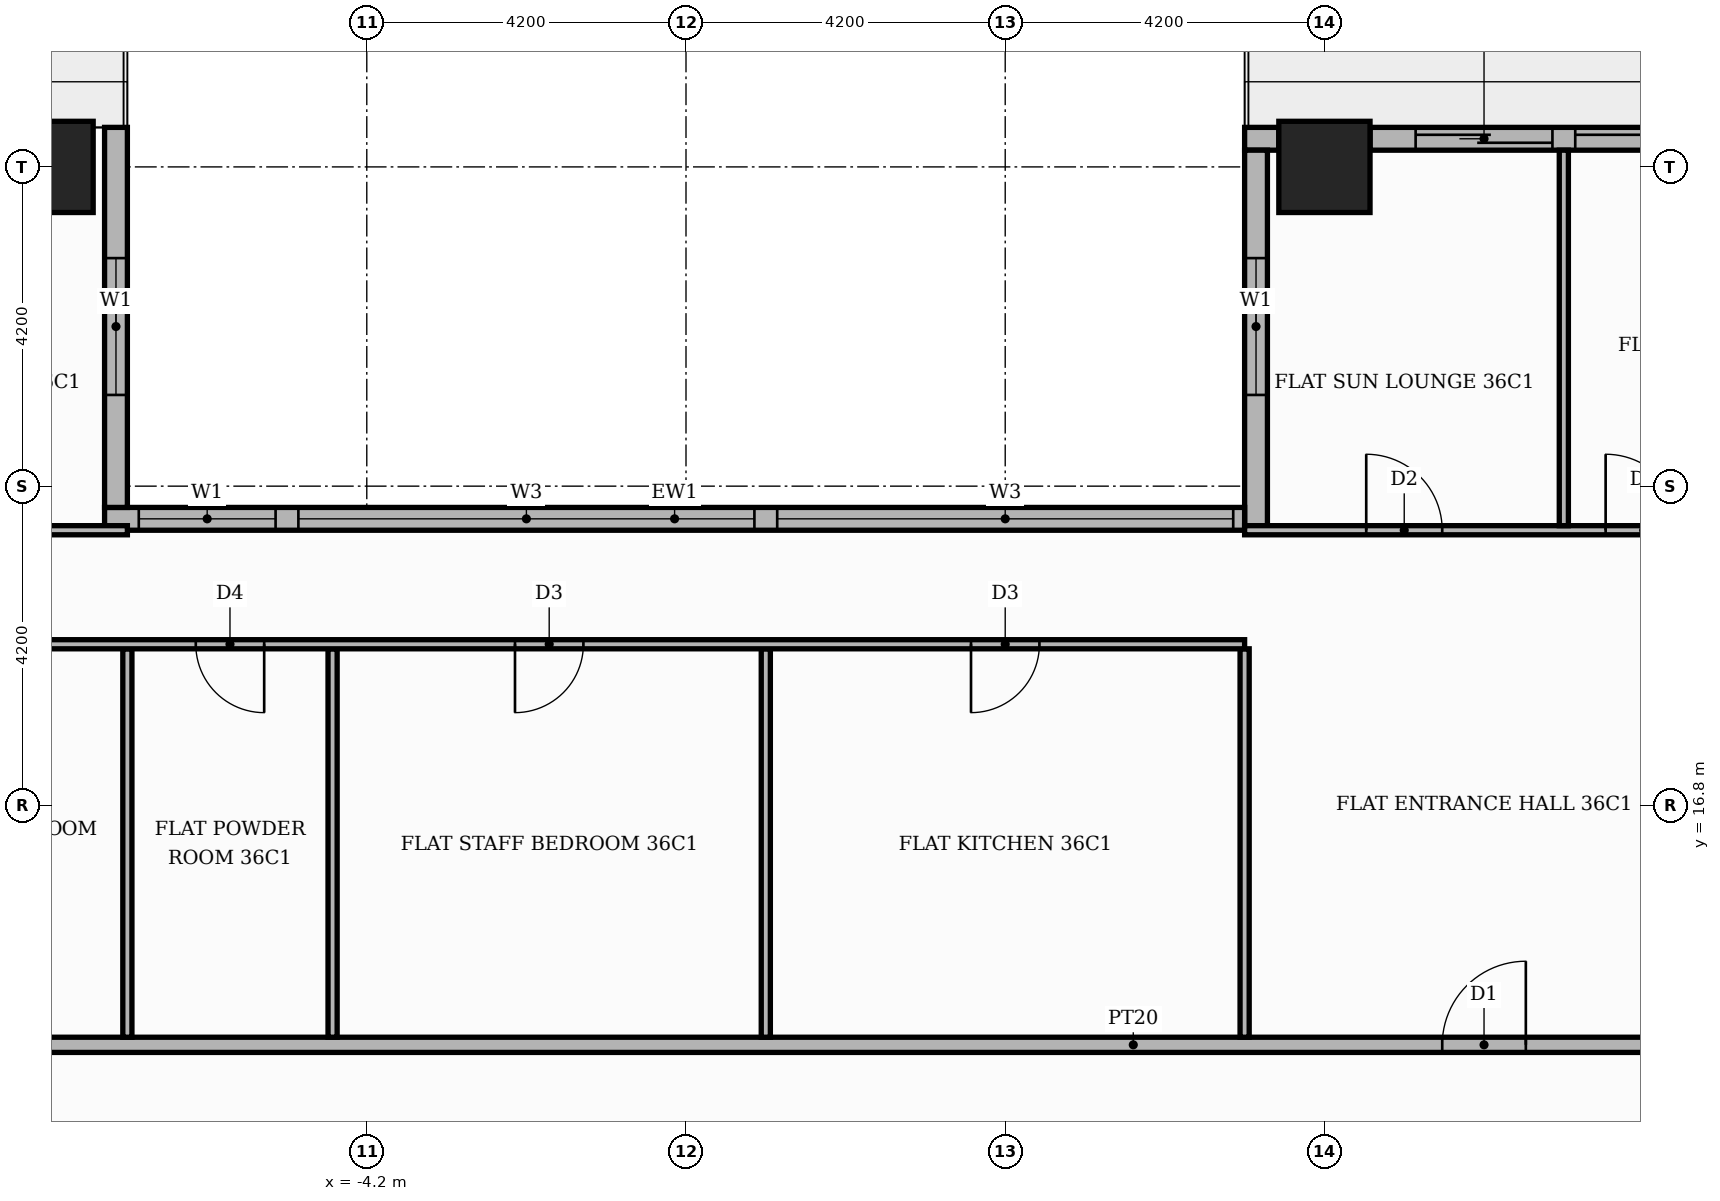
"""IFC4 building model, lengths in metres.
Left out: names, types, materials, properties, quantities, classifications, styles, units other than length and angle.
Written with IfcOpenShell. Run it as: python <this file> out.ifc"""

import sys

from ifc_helpers import new_model, si_unit, direction, frame, frame_2d, origin, origin_2d, place, context, subcontext, project, spatial, rectangle, extrude, element, fill, save


model = new_model("IFC4")
c1 = context("Model", 3, precision=1e-05, world=origin(), true_north=direction((0.0, 1.0)))
c2 = subcontext(c1, "Body", "Model", "MODEL_VIEW")
j1 = project(units=[si_unit("LENGTHUNIT", "METRE"), si_unit("PLANEANGLEUNIT", "RADIAN")], contexts=[c1])
p1 = place(None, origin())
s1 = spatial("IfcSite", under=j1, at=p1, CompositionType="ELEMENT")
p2 = place(p1, origin())
s2 = spatial("IfcBuilding", under=s1, at=p2, CompositionType="ELEMENT")
p3 = place(p2, frame((0.0, 0.0, 153.3)))
s3 = spatial("IfcBuildingStorey", under=s2, at=p3, CompositionType="ELEMENT", Elevation=153.3)
for number, where, z_axis, x_axis in (
    (1, (-8.4, 25.2, 0.0), (0.0, 0.0, 1.0), (1.0, 0.0, 0.0)),
    (2, (8.4, 25.2, 0.0), (0.0, 0.0, 1.0), (1.0, 0.0, 0.0)),
):
    element("IfcColumn", number, at=place(p3, frame(where, z_axis=z_axis, x_axis=x_axis)), inside=s3, PredefinedType="COLUMN", context=c2, shape_type="SweptSolid", body=[
        extrude(rectangle(XDim=1.2, YDim=1.2, at=origin_2d()), origin(), (0.0, 0.0, 1.0), 3.9),
    ])
p4 = place(p3, frame((16.2, 25.57, 0.0), z_axis=(0.0, 0.0, 1.0), x_axis=(-1.0, 0.0, 0.0)))
e3 = element("IfcWall", 3, at=p4, inside=s3, PredefinedType="STANDARD", context=c2, shape_type="SweptSolid", body=[
    extrude(rectangle(XDim=7.2, YDim=0.3, at=frame_2d((3.6, 0.0))), origin(), (0.0, 0.0, 1.0), 3.48),
])
p5 = place(p4, frame((0.6, 0.0, 0.0)))
e4 = element("IfcOpeningElement", 4, at=p5, cuts=e3, PredefinedType="OPENING", context=c2, shape_type="SweptSolid", body=[
    extrude(rectangle(XDim=3.9, YDim=2.4, at=frame_2d((1.95, 1.2))), frame((0.0, 0.16, 0.0), z_axis=(0.0, -1.0, 0.0), x_axis=(1.0, 0.0, 0.0)), (0.0, 0.0, 1.0), 0.32),
])
p6 = place(p4, frame((4.8, 0.0, 0.0)))
e5 = element("IfcOpeningElement", 5, at=p6, cuts=e3, PredefinedType="OPENING", context=c2, shape_type="SweptSolid", body=[
    extrude(rectangle(XDim=1.8, YDim=2.4, at=frame_2d((0.9, 1.2))), frame((0.0, 0.16, 0.0), z_axis=(0.0, -1.0, 0.0), x_axis=(1.0, 0.0, 0.0)), (0.0, 0.0, 1.0), 0.32),
])
p7 = place(p3, frame((7.8, 25.57, 0.0), z_axis=(0.0, 0.0, 1.0), x_axis=(-1.0, 0.0, 0.0)))
e6 = element("IfcWall", 6, at=p7, inside=s3, PredefinedType="STANDARD", context=c2, shape_type="SweptSolid", body=[
    extrude(rectangle(XDim=0.45, YDim=0.3, at=frame_2d((0.225, 0.0))), origin(), (0.0, 0.0, 1.0), 3.48),
])
p8 = place(p3, frame((7.5, 25.42, 0.0), z_axis=(0.0, 0.0, 1.0), x_axis=(0.0, -1.0, 0.0)))
e7 = element("IfcWall", 7, at=p8, inside=s3, PredefinedType="STANDARD", context=c2, shape_type="SweptSolid", body=[
    extrude(rectangle(XDim=5.0, YDim=0.3, at=frame_2d((2.5, 0.0))), origin(), (0.0, 0.0, 1.0), 3.48),
])
p9 = place(p8, frame((1.42, 0.0, 0.9)))
e8 = element("IfcOpeningElement", 8, at=p9, cuts=e7, PredefinedType="OPENING", context=c2, shape_type="SweptSolid", body=[
    extrude(rectangle(XDim=1.8, YDim=2.1, at=frame_2d((0.9, 1.05))), frame((0.0, 0.16, 0.0), z_axis=(0.0, -1.0, 0.0), x_axis=(1.0, 0.0, 0.0)), (0.0, 0.0, 1.0), 0.32),
])
p10 = place(p3, frame((7.35, 20.57, 0.0), z_axis=(0.0, 0.0, 1.0), x_axis=(-1.0, 0.0, 0.0)))
e9 = element("IfcWall", 9, at=p10, inside=s3, PredefinedType="STANDARD", context=c2, shape_type="SweptSolid", body=[
    extrude(rectangle(XDim=15.0, YDim=0.3, at=frame_2d((7.5, 0.0))), origin(), (0.0, 0.0, 1.0), 3.48),
])
p11 = place(p10, frame((0.15, 0.0, 0.9)))
e10 = element("IfcOpeningElement", 10, at=p11, cuts=e9, PredefinedType="OPENING", context=c2, shape_type="SweptSolid", body=[
    extrude(rectangle(XDim=6.0, YDim=2.1, at=frame_2d((3.0, 1.05))), frame((0.0, 0.16, 0.0), z_axis=(0.0, -1.0, 0.0), x_axis=(1.0, 0.0, 0.0)), (0.0, 0.0, 1.0), 0.32),
])
p12 = place(p10, frame((6.45, 0.0, 0.9)))
e11 = element("IfcOpeningElement", 11, at=p12, cuts=e9, PredefinedType="OPENING", context=c2, shape_type="SweptSolid", body=[
    extrude(rectangle(XDim=6.0, YDim=2.1, at=frame_2d((3.0, 1.05))), frame((0.0, 0.16, 0.0), z_axis=(0.0, -1.0, 0.0), x_axis=(1.0, 0.0, 0.0)), (0.0, 0.0, 1.0), 0.32),
])
p13 = place(p10, frame((12.75, 0.0, 0.9)))
e12 = element("IfcOpeningElement", 12, at=p13, cuts=e9, PredefinedType="OPENING", context=c2, shape_type="SweptSolid", body=[
    extrude(rectangle(XDim=1.8, YDim=2.1, at=frame_2d((0.9, 1.05))), frame((0.0, 0.16, 0.0), z_axis=(0.0, -1.0, 0.0), x_axis=(1.0, 0.0, 0.0)), (0.0, 0.0, 1.0), 0.32),
])
p14 = place(p3, frame((-7.5, 20.72, 0.0), z_axis=(0.0, 0.0, 1.0), x_axis=(0.0, 1.0, 0.0)))
e13 = element("IfcWall", 13, at=p14, inside=s3, PredefinedType="STANDARD", context=c2, shape_type="SweptSolid", body=[
    extrude(rectangle(XDim=5.0, YDim=0.3, at=frame_2d((2.5, 0.0))), origin(), (0.0, 0.0, 1.0), 3.48),
])
p15 = place(p14, frame((1.48, 0.0, 0.9)))
e14 = element("IfcOpeningElement", 14, at=p15, cuts=e13, PredefinedType="OPENING", context=c2, shape_type="SweptSolid", body=[
    extrude(rectangle(XDim=1.8, YDim=2.1, at=frame_2d((0.9, 1.05))), frame((0.0, 0.16, 0.0), z_axis=(0.0, -1.0, 0.0), x_axis=(1.0, 0.0, 0.0)), (0.0, 0.0, 1.0), 0.32),
])
p16 = place(p3, frame((-13.65, 13.65, 0.0), z_axis=(0.0, 0.0, 1.0), x_axis=(1.0, 0.0, 0.0)))
e15 = element("IfcWall", 15, at=p16, inside=s3, PredefinedType="PARTITIONING", context=c2, shape_type="SweptSolid", body=[
    extrude(rectangle(XDim=39.07, YDim=0.2, at=frame_2d((19.535, 0.0))), origin(), (0.0, 0.0, 1.0), 3.48),
])
p17 = place(p16, frame((23.6, 0.0, 0.0)))
e16 = element("IfcOpeningElement", 16, at=p17, cuts=e15, PredefinedType="OPENING", context=c2, shape_type="SweptSolid", body=[
    extrude(rectangle(XDim=1.1, YDim=2.4, at=frame_2d((0.55, 1.2))), frame((0.0, 0.11, 0.0), z_axis=(0.0, -1.0, 0.0), x_axis=(1.0, 0.0, 0.0)), (0.0, 0.0, 1.0), 0.22),
])
for number, where, z_axis, x_axis in (
    (17, (-7.35, 13.75, 0.0), (0.0, 0.0, 1.0), (0.0, 1.0, 0.0)),
    (18, (-4.65, 13.75, 0.0), (0.0, 0.0, 1.0), (0.0, 1.0, 0.0)),
    (19, (1.05, 13.75, 0.0), (0.0, 0.0, 1.0), (0.0, 1.0, 0.0)),
    (20, (7.35, 13.75, 0.0), (0.0, 0.0, 1.0), (0.0, 1.0, 0.0)),
):
    element("IfcWall", number, at=place(p3, frame(where, z_axis=z_axis, x_axis=x_axis)), inside=s3, PredefinedType="PARTITIONING", context=c2, shape_type="SweptSolid", body=[
        extrude(rectangle(XDim=5.11, YDim=0.12, at=frame_2d((2.555, 0.0))), origin(), (0.0, 0.0, 1.0), 3.48),
    ])
p18 = place(p3, frame((-13.55, 18.92, 0.0), z_axis=(0.0, 0.0, 1.0), x_axis=(1.0, 0.0, 0.0)))
e21 = element("IfcWall", 21, at=p18, inside=s3, PredefinedType="PARTITIONING", context=c2, shape_type="SweptSolid", body=[
    extrude(rectangle(XDim=20.9, YDim=0.12, at=frame_2d((10.45, 0.0))), origin(), (0.0, 0.0, 1.0), 3.48),
])
p19 = place(p18, frame((17.3, 0.0, 0.0)))
e22 = element("IfcOpeningElement", 22, at=p19, cuts=e21, PredefinedType="OPENING", context=c2, shape_type="SweptSolid", body=[
    extrude(rectangle(XDim=0.9, YDim=2.1, at=frame_2d((0.45, 1.05))), frame((0.0, 0.07, 0.0), z_axis=(0.0, -1.0, 0.0), x_axis=(1.0, 0.0, 0.0)), (0.0, 0.0, 1.0), 0.14),
])
p20 = place(p18, frame((11.3, 0.0, 0.0)))
e23 = element("IfcOpeningElement", 23, at=p20, cuts=e21, PredefinedType="OPENING", context=c2, shape_type="SweptSolid", body=[
    extrude(rectangle(XDim=0.9, YDim=2.1, at=frame_2d((0.45, 1.05))), frame((0.0, 0.07, 0.0), z_axis=(0.0, -1.0, 0.0), x_axis=(1.0, 0.0, 0.0)), (0.0, 0.0, 1.0), 0.14),
])
p21 = place(p18, frame((7.1, 0.0, 0.0)))
e24 = element("IfcOpeningElement", 24, at=p21, cuts=e21, PredefinedType="OPENING", context=c2, shape_type="SweptSolid", body=[
    extrude(rectangle(XDim=0.9, YDim=2.1, at=frame_2d((0.45, 1.05))), frame((0.0, 0.07, 0.0), z_axis=(0.0, -1.0, 0.0), x_axis=(1.0, 0.0, 0.0)), (0.0, 0.0, 1.0), 0.14),
])
p22 = place(p18, frame((3.65, 0.0, 0.0)))
e25 = element("IfcOpeningElement", 25, at=p22, cuts=e21, PredefinedType="OPENING", context=c2, shape_type="SweptSolid", body=[
    extrude(rectangle(XDim=0.9, YDim=2.1, at=frame_2d((0.45, 1.05))), frame((0.0, 0.07, 0.0), z_axis=(0.0, -1.0, 0.0), x_axis=(1.0, 0.0, 0.0)), (0.0, 0.0, 1.0), 0.14),
])
p23 = place(p18, frame((0.5, 0.0, 0.0)))
e26 = element("IfcOpeningElement", 26, at=p23, cuts=e21, PredefinedType="OPENING", context=c2, shape_type="SweptSolid", body=[
    extrude(rectangle(XDim=0.9, YDim=2.1, at=frame_2d((0.45, 1.05))), frame((0.0, 0.07, 0.0), z_axis=(0.0, -1.0, 0.0), x_axis=(1.0, 0.0, 0.0)), (0.0, 0.0, 1.0), 0.14),
])
p24 = place(p3, frame((-13.55, 20.42, 0.0), z_axis=(0.0, 0.0, 1.0), x_axis=(1.0, 0.0, 0.0)))
e27 = element("IfcWall", 27, at=p24, inside=s3, PredefinedType="PARTITIONING", context=c2, shape_type="SweptSolid", body=[
    extrude(rectangle(XDim=6.2, YDim=0.12, at=frame_2d((3.1, 0.0))), origin(), (0.0, 0.0, 1.0), 3.48),
])
p25 = place(p24, frame((3.65, 0.0, 0.0)))
e28 = element("IfcOpeningElement", 28, at=p25, cuts=e27, PredefinedType="OPENING", context=c2, shape_type="SweptSolid", body=[
    extrude(rectangle(XDim=0.9, YDim=2.1, at=frame_2d((0.45, 1.05))), frame((0.0, 0.07, 0.0), z_axis=(0.0, -1.0, 0.0), x_axis=(1.0, 0.0, 0.0)), (0.0, 0.0, 1.0), 0.14),
])
p26 = place(p3, frame((7.35, 20.42, 0.0), z_axis=(0.0, 0.0, 1.0), x_axis=(1.0, 0.0, 0.0)))
e29 = element("IfcWall", 29, at=p26, inside=s3, PredefinedType="PARTITIONING", context=c2, shape_type="SweptSolid", body=[
    extrude(rectangle(XDim=18.07, YDim=0.12, at=frame_2d((9.035, 0.0))), origin(), (0.0, 0.0, 1.0), 3.48),
])
p27 = place(p26, frame((4.75, 0.0, 0.0)))
e30 = element("IfcOpeningElement", 30, at=p27, cuts=e29, PredefinedType="OPENING", context=c2, shape_type="SweptSolid", body=[
    extrude(rectangle(XDim=1.0, YDim=2.1, at=frame_2d((0.5, 1.05))), frame((0.0, 0.07, 0.0), z_axis=(0.0, -1.0, 0.0), x_axis=(1.0, 0.0, 0.0)), (0.0, 0.0, 1.0), 0.14),
])
p28 = place(p26, frame((1.6, 0.0, 0.0)))
e31 = element("IfcOpeningElement", 31, at=p28, cuts=e29, PredefinedType="OPENING", context=c2, shape_type="SweptSolid", body=[
    extrude(rectangle(XDim=1.0, YDim=2.1, at=frame_2d((0.5, 1.05))), frame((0.0, 0.07, 0.0), z_axis=(0.0, -1.0, 0.0), x_axis=(1.0, 0.0, 0.0)), (0.0, 0.0, 1.0), 0.14),
])
p29 = place(p3, frame((11.55, 20.48, 0.0), z_axis=(0.0, 0.0, 1.0), x_axis=(0.0, 1.0, 0.0)))
e32 = element("IfcWall", 32, at=p29, inside=s3, PredefinedType="PARTITIONING", context=c2, shape_type="SweptSolid", body=[
    extrude(rectangle(XDim=4.94, YDim=0.12, at=frame_2d((2.47, 0.0))), origin(), (0.0, 0.0, 1.0), 3.48),
])
p30 = place(p5, origin())
e33 = element("IfcDoor", 33, at=p30, inside=s3, OperationType="SLIDING_TO_LEFT", PredefinedType="DOOR", context=c2, shape_type="SweptSolid", body=[
    extrude(rectangle(XDim=3.9, YDim=2.4, at=frame_2d((1.95, 1.2))), frame((0.0, 0.025, 0.0), z_axis=(0.0, -1.0, 0.0), x_axis=(1.0, 0.0, 0.0)), (0.0, 0.0, 1.0), 0.05),
])
fill(e4, e33)
p31 = place(p6, origin())
e34 = element("IfcDoor", 34, at=p31, inside=s3, OperationType="SLIDING_TO_RIGHT", PredefinedType="DOOR", context=c2, shape_type="SweptSolid", body=[
    extrude(rectangle(XDim=1.8, YDim=2.4, at=frame_2d((0.9, 1.2))), frame((0.0, 0.025, 0.0), z_axis=(0.0, -1.0, 0.0), x_axis=(1.0, 0.0, 0.0)), (0.0, 0.0, 1.0), 0.05),
])
fill(e5, e34)
p32 = place(p9, origin())
e35 = element("IfcWindow", 35, at=p32, inside=s3, PartitioningType="SINGLE_PANEL", PredefinedType="WINDOW", context=c2, shape_type="SweptSolid", body=[
    extrude(rectangle(XDim=1.8, YDim=2.1, at=frame_2d((0.9, 1.05))), frame((0.0, 0.03, 0.0), z_axis=(0.0, -1.0, 0.0), x_axis=(1.0, 0.0, 0.0)), (0.0, 0.0, 1.0), 0.06),
])
fill(e8, e35)
p33 = place(p11, origin())
e36 = element("IfcWindow", 36, at=p33, inside=s3, PartitioningType="SINGLE_PANEL", PredefinedType="WINDOW", context=c2, shape_type="SweptSolid", body=[
    extrude(rectangle(XDim=6.0, YDim=2.1, at=frame_2d((3.0, 1.05))), frame((0.0, 0.03, 0.0), z_axis=(0.0, -1.0, 0.0), x_axis=(1.0, 0.0, 0.0)), (0.0, 0.0, 1.0), 0.06),
])
fill(e10, e36)
p34 = place(p12, origin())
e37 = element("IfcWindow", 37, at=p34, inside=s3, PartitioningType="SINGLE_PANEL", PredefinedType="WINDOW", context=c2, shape_type="SweptSolid", body=[
    extrude(rectangle(XDim=6.0, YDim=2.1, at=frame_2d((3.0, 1.05))), frame((0.0, 0.03, 0.0), z_axis=(0.0, -1.0, 0.0), x_axis=(1.0, 0.0, 0.0)), (0.0, 0.0, 1.0), 0.06),
])
fill(e11, e37)
p35 = place(p13, origin())
e38 = element("IfcWindow", 38, at=p35, inside=s3, PartitioningType="SINGLE_PANEL", PredefinedType="WINDOW", context=c2, shape_type="SweptSolid", body=[
    extrude(rectangle(XDim=1.8, YDim=2.1, at=frame_2d((0.9, 1.05))), frame((0.0, 0.03, 0.0), z_axis=(0.0, -1.0, 0.0), x_axis=(1.0, 0.0, 0.0)), (0.0, 0.0, 1.0), 0.06),
])
fill(e12, e38)
p36 = place(p15, origin())
e39 = element("IfcWindow", 39, at=p36, inside=s3, PartitioningType="SINGLE_PANEL", PredefinedType="WINDOW", context=c2, shape_type="SweptSolid", body=[
    extrude(rectangle(XDim=1.8, YDim=2.1, at=frame_2d((0.9, 1.05))), frame((0.0, 0.03, 0.0), z_axis=(0.0, -1.0, 0.0), x_axis=(1.0, 0.0, 0.0)), (0.0, 0.0, 1.0), 0.06),
])
fill(e14, e39)
p37 = place(p17, origin())
e40 = element("IfcDoor", 40, at=p37, inside=s3, OperationType="SINGLE_SWING_RIGHT", PredefinedType="DOOR", context=c2, shape_type="SweptSolid", body=[
    extrude(rectangle(XDim=1.1, YDim=2.4, at=frame_2d((0.55, 1.2))), frame((0.0, 0.025, 0.0), z_axis=(0.0, -1.0, 0.0), x_axis=(1.0, 0.0, 0.0)), (0.0, 0.0, 1.0), 0.05),
])
fill(e16, e40)
p38 = place(p19, frame((0.9, 0.0, 0.0), z_axis=(0.0, 0.0, 1.0), x_axis=(-1.0, 0.0, 0.0)))
e41 = element("IfcDoor", 41, at=p38, inside=s3, OperationType="SINGLE_SWING_LEFT", PredefinedType="DOOR", context=c2, shape_type="SweptSolid", body=[
    extrude(rectangle(XDim=0.9, YDim=2.1, at=frame_2d((0.45, 1.05))), frame((0.0, 0.025, 0.0), z_axis=(0.0, -1.0, 0.0), x_axis=(1.0, 0.0, 0.0)), (0.0, 0.0, 1.0), 0.05),
])
fill(e22, e41)
p39 = place(p20, frame((0.9, 0.0, 0.0), z_axis=(0.0, 0.0, 1.0), x_axis=(-1.0, 0.0, 0.0)))
e42 = element("IfcDoor", 42, at=p39, inside=s3, OperationType="SINGLE_SWING_LEFT", PredefinedType="DOOR", context=c2, shape_type="SweptSolid", body=[
    extrude(rectangle(XDim=0.9, YDim=2.1, at=frame_2d((0.45, 1.05))), frame((0.0, 0.025, 0.0), z_axis=(0.0, -1.0, 0.0), x_axis=(1.0, 0.0, 0.0)), (0.0, 0.0, 1.0), 0.05),
])
fill(e23, e42)
p40 = place(p21, frame((0.9, 0.0, 0.0), z_axis=(0.0, 0.0, 1.0), x_axis=(-1.0, 0.0, 0.0)))
e43 = element("IfcDoor", 43, at=p40, inside=s3, OperationType="SINGLE_SWING_RIGHT", PredefinedType="DOOR", context=c2, shape_type="SweptSolid", body=[
    extrude(rectangle(XDim=0.9, YDim=2.1, at=frame_2d((0.45, 1.05))), frame((0.0, 0.025, 0.0), z_axis=(0.0, -1.0, 0.0), x_axis=(1.0, 0.0, 0.0)), (0.0, 0.0, 1.0), 0.05),
])
fill(e24, e43)
p41 = place(p27, origin())
e44 = element("IfcDoor", 44, at=p41, inside=s3, OperationType="SINGLE_SWING_LEFT", PredefinedType="DOOR", context=c2, shape_type="SweptSolid", body=[
    extrude(rectangle(XDim=1.0, YDim=2.1, at=frame_2d((0.5, 1.05))), frame((0.0, 0.025, 0.0), z_axis=(0.0, -1.0, 0.0), x_axis=(1.0, 0.0, 0.0)), (0.0, 0.0, 1.0), 0.05),
])
fill(e30, e44)
p42 = place(p28, origin())
e45 = element("IfcDoor", 45, at=p42, inside=s3, OperationType="SINGLE_SWING_LEFT", PredefinedType="DOOR", context=c2, shape_type="SweptSolid", body=[
    extrude(rectangle(XDim=1.0, YDim=2.1, at=frame_2d((0.5, 1.05))), frame((0.0, 0.025, 0.0), z_axis=(0.0, -1.0, 0.0), x_axis=(1.0, 0.0, 0.0)), (0.0, 0.0, 1.0), 0.05),
])
fill(e31, e45)
save(model, sys.argv[1])
